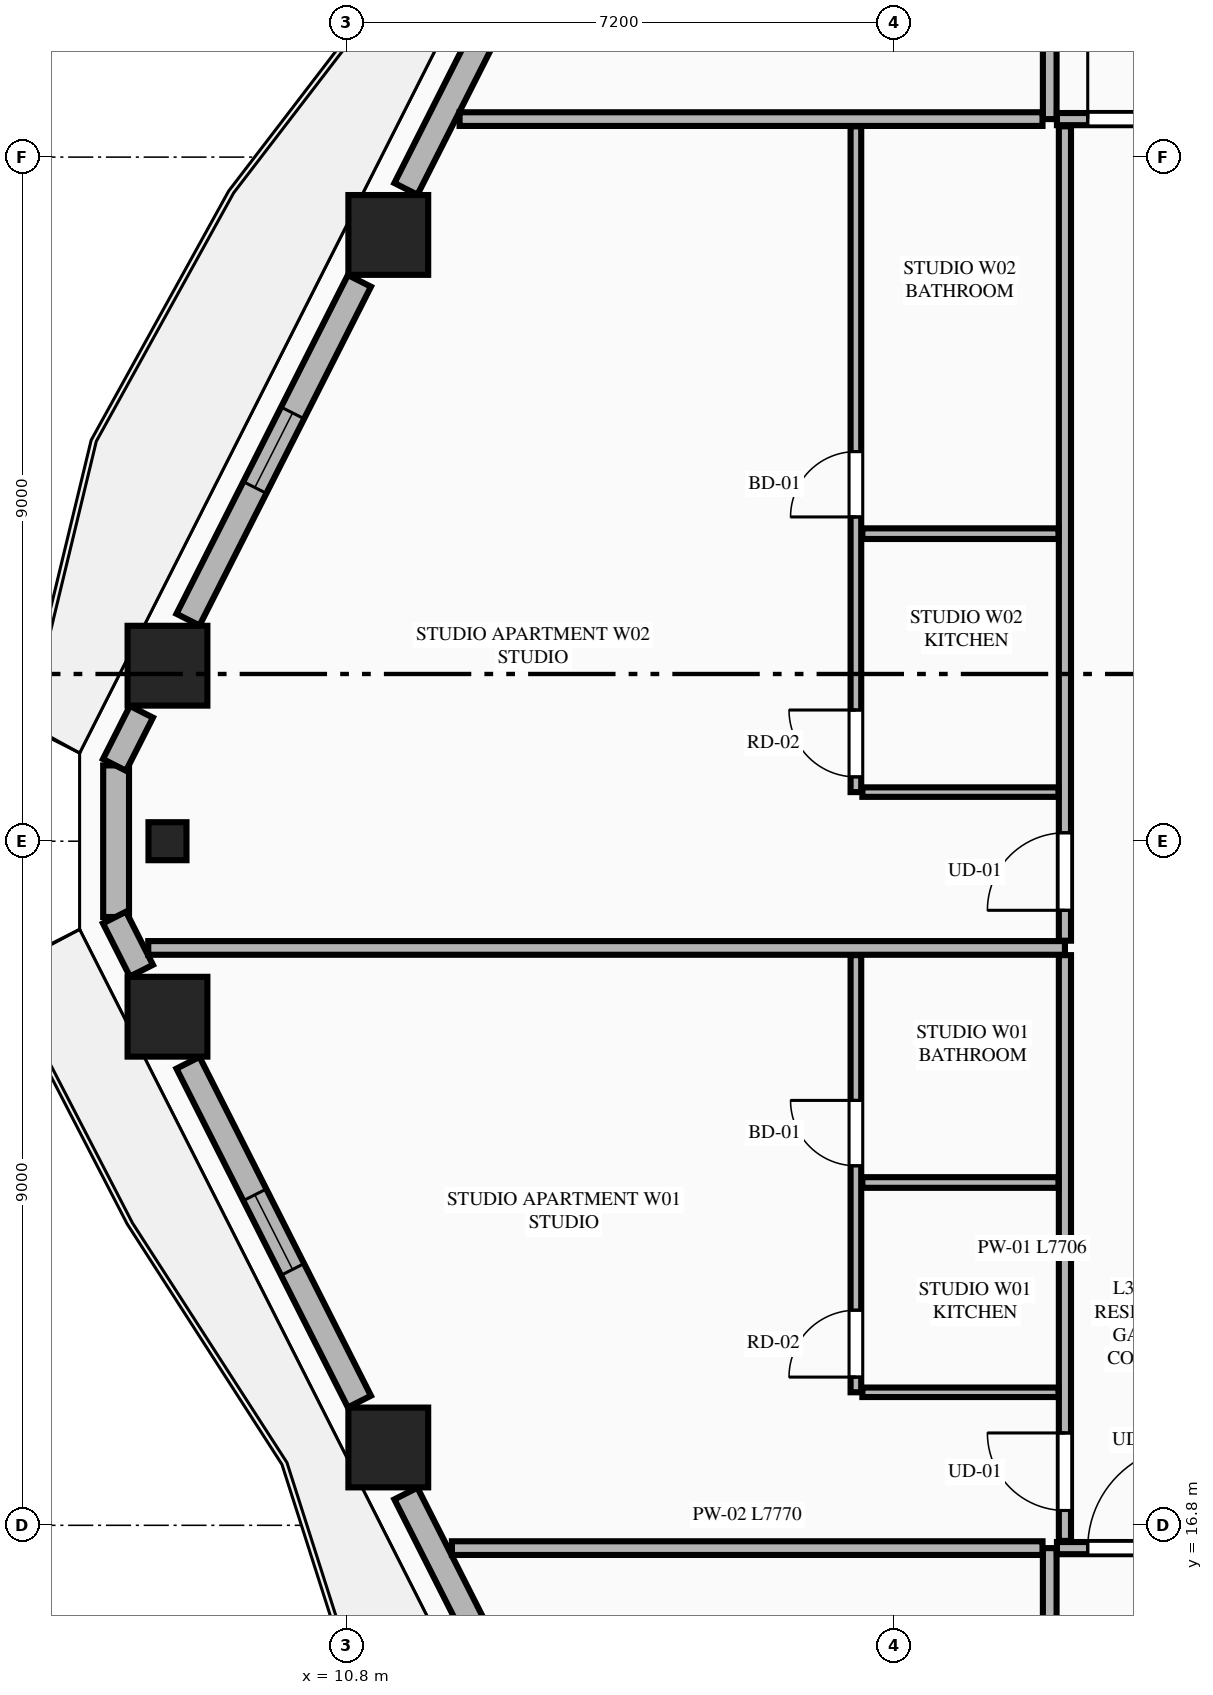
"""IFC4 building model, lengths in metres.
Left out: names, types, materials, properties, quantities, classifications, styles, units other than length and angle.
Written with IfcOpenShell. Run it as: python <this file> out.ifc"""

import sys

from ifc_helpers import new_model, si_unit, direction, frame, frame_2d, origin, origin_2d, place, context, subcontext, project, spatial, rectangle, extrude, element, fill, save


model = new_model("IFC4")
c1 = context("Model", 3, precision=1e-05, world=origin(), true_north=direction((0.0, 1.0)))
c2 = subcontext(c1, "Body", "Model", "MODEL_VIEW")
j1 = project(units=[si_unit("LENGTHUNIT", "METRE"), si_unit("PLANEANGLEUNIT", "RADIAN")], contexts=[c1])
p1 = place(None, origin())
s1 = spatial("IfcSite", under=j1, at=p1, CompositionType="ELEMENT")
p2 = place(p1, origin())
s2 = spatial("IfcBuilding", under=s1, at=p2, CompositionType="ELEMENT")
p3 = place(p2, frame((0.0, 0.0, 144.55)))
s3 = spatial("IfcBuildingStorey", under=s2, at=p3, CompositionType="ELEMENT", Elevation=144.55)
for number, where, z_axis, x_axis in (
    (1, (11.348, 33.776, 0.0), (0.0, 0.0, 1.0), (1.0, 0.0, 0.0)),
    (2, (8.443, 28.109, 0.0), (0.0, 0.0, 1.0), (1.0, 0.0, 0.0)),
    (3, (8.443, 23.491, 0.0), (0.0, 0.0, 1.0), (1.0, 0.0, 0.0)),
    (4, (11.348, 17.824, 0.0), (0.0, 0.0, 1.0), (1.0, 0.0, 0.0)),
):
    element("IfcColumn", number, at=place(p3, frame(where, z_axis=z_axis, x_axis=x_axis)), inside=s3, PredefinedType="COLUMN", context=c2, shape_type="SweptSolid", body=[
        extrude(rectangle(XDim=1.05, YDim=1.05, at=origin_2d()), origin(), (0.0, 0.0, 1.0), 3.55),
    ])
p4 = place(p3, frame((8.443, 25.8, 0.0), z_axis=(0.0, 0.0, 1.0), x_axis=(0.0, -1.0, 0.0)))
e5 = element("IfcColumn", 5, at=p4, inside=s3, PredefinedType="PILASTER", context=c2, shape_type="SweptSolid", body=[
    extrude(rectangle(XDim=0.5, YDim=0.35, at=origin_2d()), origin(), (0.0, 0.0, 1.0), 3.55),
])
p5 = place(p3, frame((7.767, 26.797, 0.0), z_axis=(0.0, 0.0, 1.0), x_axis=(0.0, -1.0, 0.0)))
e6 = element("IfcWall", 6, at=p5, inside=s3, PredefinedType="STANDARD", context=c2, shape_type="SweptSolid", body=[
    extrude(rectangle(XDim=1.994, YDim=0.34, at=frame_2d((0.997, 0.0))), origin(), (0.0, 0.0, 1.0), 3.27),
])
p6 = place(p3, frame((13.937, 39.039, 0.0), z_axis=(0.0, 0.0, 1.0), x_axis=(-0.451567731634, -0.892236842855, 0.0)))
e7 = element("IfcWall", 7, at=p6, inside=s3, PredefinedType="STANDARD", context=c2, shape_type="SweptSolid", body=[
    extrude(rectangle(XDim=5.219, YDim=0.34, at=frame_2d((2.61, 0.0))), origin(), (0.0, 0.0, 1.0), 2.727),
])
p7 = place(p6, frame((1.42, 0.0, 0.0)))
e8 = element("IfcOpeningElement", 8, at=p7, cuts=e7, PredefinedType="OPENING", context=c2, shape_type="SweptSolid", body=[
    extrude(rectangle(XDim=1.1, YDim=2.25, at=frame_2d((0.55, 1.125))), frame((0.0, 0.18, 0.0), z_axis=(0.0, -1.0, 0.0), x_axis=(1.0, 0.0, 0.0)), (0.0, 0.0, 1.0), 0.36),
])
p8 = place(p3, frame((10.968, 33.172, 0.0), z_axis=(0.0, 0.0, 1.0), x_axis=(-0.451470533039, -0.892286029139, 0.0)))
e9 = element("IfcWall", 9, at=p8, inside=s3, PredefinedType="STANDARD", context=c2, shape_type="SweptSolid", body=[
    extrude(rectangle(XDim=4.995, YDim=0.34, at=frame_2d((2.498, 0.0))), origin(), (0.0, 0.0, 1.0), 2.727),
])
p9 = place(p8, frame((1.947, 0.0, 0.75)))
e10 = element("IfcOpeningElement", 10, at=p9, cuts=e9, PredefinedType="OPENING", context=c2, shape_type="SweptSolid", body=[
    extrude(rectangle(XDim=1.1, YDim=1.827, at=frame_2d((0.55, 0.914))), frame((0.0, 0.18, 0.0), z_axis=(0.0, -1.0, 0.0), x_axis=(1.0, 0.0, 0.0)), (0.0, 0.0, 1.0), 0.36),
])
for number, where, z_axis, x_axis in (
    (11, (8.1, 27.503, 0.0), (0.0, 0.0, 1.0), (-0.452, -0.892, 0.0)),
    (12, (7.746, 24.796, 0.0), (0.0, 0.0, 1.0), (0.452, -0.892, 0.0)),
):
    element("IfcWall", number, at=place(p3, frame(where, z_axis=z_axis, x_axis=x_axis)), inside=s3, PredefinedType="STANDARD", context=c2, shape_type="SweptSolid", body=[
        extrude(rectangle(XDim=0.783, YDim=0.34, at=frame_2d((0.392, 0.0))), origin(), (0.0, 0.0, 1.0), 3.27),
    ])
p10 = place(p3, frame((8.713, 22.885, 0.0), z_axis=(0.0, 0.0, 1.0), x_axis=(0.451470533039, -0.892286029139, 0.0)))
e13 = element("IfcWall", 13, at=p10, inside=s3, PredefinedType="STANDARD", context=c2, shape_type="SweptSolid", body=[
    extrude(rectangle(XDim=4.995, YDim=0.34, at=frame_2d((2.498, 0.0))), origin(), (0.0, 0.0, 1.0), 2.727),
])
p11 = place(p10, frame((1.947, 0.0, 0.75)))
e14 = element("IfcOpeningElement", 14, at=p11, cuts=e13, PredefinedType="OPENING", context=c2, shape_type="SweptSolid", body=[
    extrude(rectangle(XDim=1.1, YDim=1.827, at=frame_2d((0.55, 0.914))), frame((0.0, 0.18, 0.0), z_axis=(0.0, -1.0, 0.0), x_axis=(1.0, 0.0, 0.0)), (0.0, 0.0, 1.0), 0.36),
])
p12 = place(p3, frame((11.58, 17.218, 0.0), z_axis=(0.0, 0.0, 1.0), x_axis=(0.451567731634, -0.892236842855, 0.0)))
e15 = element("IfcWall", 15, at=p12, inside=s3, PredefinedType="STANDARD", context=c2, shape_type="SweptSolid", body=[
    extrude(rectangle(XDim=5.219, YDim=0.34, at=frame_2d((2.61, 0.0))), origin(), (0.0, 0.0, 1.0), 2.727),
])
p13 = place(p12, frame((2.587, 0.0, 0.0)))
e16 = element("IfcOpeningElement", 16, at=p13, cuts=e15, PredefinedType="OPENING", context=c2, shape_type="SweptSolid", body=[
    extrude(rectangle(XDim=1.1, YDim=2.25, at=frame_2d((0.55, 1.125))), frame((0.0, 0.18, 0.0), z_axis=(0.0, -1.0, 0.0), x_axis=(1.0, 0.0, 0.0)), (0.0, 0.0, 1.0), 0.36),
])
p14 = place(p3, frame((20.05, 4.105, 0.0), z_axis=(0.0, 0.0, 1.0), x_axis=(0.0, 1.0, 0.0)))
e17 = element("IfcWall", 17, at=p14, inside=s3, PredefinedType="PARTITIONING", context=c2, shape_type="SweptSolid", body=[
    extrude(rectangle(XDim=12.395, YDim=0.18, at=frame_2d((6.198, 0.0))), origin(), (0.0, 0.0, 1.0), 3.27),
])
p15 = place(p3, frame((20.145, 16.5, 0.0), z_axis=(0.0, 0.0, 1.0), x_axis=(1.0, 0.0, 0.0)))
e18 = element("IfcWall", 18, at=p15, inside=s3, PredefinedType="PARTITIONING", context=c2, shape_type="SweptSolid", body=[
    extrude(rectangle(XDim=24.51, YDim=0.16, at=frame_2d((12.255, 0.0))), origin(), (0.0, 0.0, 1.0), 3.27),
])
p16 = place(p15, frame((0.405, 0.0, 0.0)))
e19 = element("IfcOpeningElement", 19, at=p16, cuts=e18, PredefinedType="OPENING", context=c2, shape_type="SweptSolid", body=[
    extrude(rectangle(XDim=1.35, YDim=2.35, at=frame_2d((0.675, 1.175))), frame((0.0, 0.09, 0.0), z_axis=(0.0, -1.0, 0.0), x_axis=(1.0, 0.0, 0.0)), (0.0, 0.0, 1.0), 0.18),
])
p17 = place(p3, frame((20.05, 35.3, 0.0), z_axis=(0.0, 0.0, 1.0), x_axis=(0.0, 1.0, 0.0)))
e20 = element("IfcWall", 20, at=p17, inside=s3, PredefinedType="PARTITIONING", context=c2, shape_type="SweptSolid", body=[
    extrude(rectangle(XDim=12.195, YDim=0.18, at=frame_2d((6.098, 0.0))), origin(), (0.0, 0.0, 1.0), 3.27),
])
p18 = place(p3, frame((20.145, 35.3, 0.0), z_axis=(0.0, 0.0, 1.0), x_axis=(1.0, 0.0, 0.0)))
e21 = element("IfcWall", 21, at=p18, inside=s3, PredefinedType="PARTITIONING", context=c2, shape_type="SweptSolid", body=[
    extrude(rectangle(XDim=24.51, YDim=0.16, at=frame_2d((12.255, 0.0))), origin(), (0.0, 0.0, 1.0), 3.27),
])
p19 = place(p18, frame((0.405, 0.0, 0.0)))
e22 = element("IfcOpeningElement", 22, at=p19, cuts=e21, PredefinedType="OPENING", context=c2, shape_type="SweptSolid", body=[
    extrude(rectangle(XDim=1.35, YDim=2.35, at=frame_2d((0.675, 1.175))), frame((0.0, 0.09, 0.0), z_axis=(0.0, -1.0, 0.0), x_axis=(1.0, 0.0, 0.0)), (0.0, 0.0, 1.0), 0.18),
])
p20 = place(p3, frame((12.185, 16.5, 0.0), z_axis=(0.0, 0.0, 1.0), x_axis=(1.0, 0.0, 0.0)))
e23 = element("IfcWall", 23, at=p20, inside=s3, PredefinedType="PARTITIONING", context=c2, shape_type="SweptSolid", body=[
    extrude(rectangle(XDim=7.77, YDim=0.18, at=frame_2d((3.885, 0.0))), origin(), (0.0, 0.0, 1.0), 3.27),
])
p21 = place(p3, frame((12.286, 35.3, 0.0), z_axis=(0.0, 0.0, 1.0), x_axis=(1.0, 0.0, 0.0)))
e24 = element("IfcWall", 24, at=p21, inside=s3, PredefinedType="PARTITIONING", context=c2, shape_type="SweptSolid", body=[
    extrude(rectangle(XDim=7.669, YDim=0.18, at=frame_2d((3.834, 0.0))), origin(), (0.0, 0.0, 1.0), 3.27),
])
p22 = place(p3, frame((20.25, 16.595, 0.0), z_axis=(0.0, 0.0, 1.0), x_axis=(0.0, 1.0, 0.0)))
e25 = element("IfcWall", 25, at=p22, inside=s3, PredefinedType="PARTITIONING", context=c2, shape_type="SweptSolid", body=[
    extrude(rectangle(XDim=7.706, YDim=0.16, at=frame_2d((3.853, 0.0))), origin(), (0.0, 0.0, 1.0), 3.27),
])
p23 = place(p22, frame((0.4, 0.0, 0.0)))
e26 = element("IfcOpeningElement", 26, at=p23, cuts=e25, PredefinedType="OPENING", context=c2, shape_type="SweptSolid", body=[
    extrude(rectangle(XDim=1.02, YDim=2.25, at=frame_2d((0.51, 1.125))), frame((0.0, 0.09, 0.0), z_axis=(0.0, -1.0, 0.0), x_axis=(1.0, 0.0, 0.0)), (0.0, 0.0, 1.0), 0.18),
])
p24 = place(p3, frame((17.585, 18.55, 0.0), z_axis=(0.0, 0.0, 1.0), x_axis=(1.0, 0.0, 0.0)))
e27 = element("IfcWall", 27, at=p24, inside=s3, PredefinedType="PARTITIONING", context=c2, shape_type="SweptSolid", body=[
    extrude(rectangle(XDim=2.58, YDim=0.125, at=frame_2d((1.29, 0.0))), origin(), (0.0, 0.0, 1.0), 2.652),
])
p25 = place(p3, frame((17.5, 18.55, 0.0), z_axis=(0.0, 0.0, 1.0), x_axis=(0.0, 1.0, 0.0)))
e28 = element("IfcWall", 28, at=p25, inside=s3, PredefinedType="PLUMBINGWALL", context=c2, shape_type="SweptSolid", body=[
    extrude(rectangle(XDim=5.751, YDim=0.14, at=frame_2d((2.875, 0.0))), origin(), (0.0, 0.0, 1.0), 3.27),
])
p26 = place(p25, frame((2.98, 0.0, 0.0)))
e29 = element("IfcOpeningElement", 29, at=p26, cuts=e28, PredefinedType="OPENING", context=c2, shape_type="SweptSolid", body=[
    extrude(rectangle(XDim=0.86, YDim=2.1, at=frame_2d((0.43, 1.05))), frame((0.0, 0.08, 0.0), z_axis=(0.0, -1.0, 0.0), x_axis=(1.0, 0.0, 0.0)), (0.0, 0.0, 1.0), 0.16),
])
p27 = place(p25, frame((0.2, 0.0, 0.0)))
e30 = element("IfcOpeningElement", 30, at=p27, cuts=e28, PredefinedType="OPENING", context=c2, shape_type="SweptSolid", body=[
    extrude(rectangle(XDim=0.88, YDim=2.15, at=frame_2d((0.44, 1.075))), frame((0.0, 0.08, 0.0), z_axis=(0.0, -1.0, 0.0), x_axis=(1.0, 0.0, 0.0)), (0.0, 0.0, 1.0), 0.16),
])
p28 = place(p3, frame((17.585, 21.31, 0.0), z_axis=(0.0, 0.0, 1.0), x_axis=(1.0, 0.0, 0.0)))
e31 = element("IfcWall", 31, at=p28, inside=s3, PredefinedType="PLUMBINGWALL", context=c2, shape_type="SweptSolid", body=[
    extrude(rectangle(XDim=2.58, YDim=0.14, at=frame_2d((1.29, 0.0))), origin(), (0.0, 0.0, 1.0), 3.27),
])
p29 = place(p3, frame((8.19, 24.396, 0.0), z_axis=(0.0, 0.0, 1.0), x_axis=(1.0, 0.0, 0.0)))
e32 = element("IfcWall", 32, at=p29, inside=s3, PredefinedType="PARTITIONING", context=c2, shape_type="SweptSolid", body=[
    extrude(rectangle(XDim=12.06, YDim=0.18, at=frame_2d((6.03, 0.0))), origin(), (0.0, 0.0, 1.0), 3.27),
])
p30 = place(p3, frame((20.25, 24.491, 0.0), z_axis=(0.0, 0.0, 1.0), x_axis=(0.0, 1.0, 0.0)))
e33 = element("IfcWall", 33, at=p30, inside=s3, PredefinedType="PARTITIONING", context=c2, shape_type="SweptSolid", body=[
    extrude(rectangle(XDim=10.714, YDim=0.16, at=frame_2d((5.357, 0.0))), origin(), (0.0, 0.0, 1.0), 3.27),
])
p31 = place(p30, frame((0.4, 0.0, 0.0)))
e34 = element("IfcOpeningElement", 34, at=p31, cuts=e33, PredefinedType="OPENING", context=c2, shape_type="SweptSolid", body=[
    extrude(rectangle(XDim=1.02, YDim=2.25, at=frame_2d((0.51, 1.125))), frame((0.0, 0.09, 0.0), z_axis=(0.0, -1.0, 0.0), x_axis=(1.0, 0.0, 0.0)), (0.0, 0.0, 1.0), 0.18),
])
p32 = place(p3, frame((17.585, 26.446, 0.0), z_axis=(0.0, 0.0, 1.0), x_axis=(1.0, 0.0, 0.0)))
e35 = element("IfcWall", 35, at=p32, inside=s3, PredefinedType="PARTITIONING", context=c2, shape_type="SweptSolid", body=[
    extrude(rectangle(XDim=2.58, YDim=0.125, at=frame_2d((1.29, 0.0))), origin(), (0.0, 0.0, 1.0), 3.27),
])
p33 = place(p3, frame((17.5, 26.446, 0.0), z_axis=(0.0, 0.0, 1.0), x_axis=(0.0, 1.0, 0.0)))
e36 = element("IfcWall", 36, at=p33, inside=s3, PredefinedType="PLUMBINGWALL", context=c2, shape_type="SweptSolid", body=[
    extrude(rectangle(XDim=8.759, YDim=0.14, at=frame_2d((4.379, 0.0))), origin(), (0.0, 0.0, 1.0), 3.27),
])
p34 = place(p33, frame((3.62, 0.0, 0.0)))
e37 = element("IfcOpeningElement", 37, at=p34, cuts=e36, PredefinedType="OPENING", context=c2, shape_type="SweptSolid", body=[
    extrude(rectangle(XDim=0.86, YDim=2.1, at=frame_2d((0.43, 1.05))), frame((0.0, 0.08, 0.0), z_axis=(0.0, -1.0, 0.0), x_axis=(1.0, 0.0, 0.0)), (0.0, 0.0, 1.0), 0.16),
])
p35 = place(p33, frame((0.2, 0.0, 0.0)))
e38 = element("IfcOpeningElement", 38, at=p35, cuts=e36, PredefinedType="OPENING", context=c2, shape_type="SweptSolid", body=[
    extrude(rectangle(XDim=0.88, YDim=2.15, at=frame_2d((0.44, 1.075))), frame((0.0, 0.08, 0.0), z_axis=(0.0, -1.0, 0.0), x_axis=(1.0, 0.0, 0.0)), (0.0, 0.0, 1.0), 0.16),
])
p36 = place(p3, frame((17.585, 29.846, 0.0), z_axis=(0.0, 0.0, 1.0), x_axis=(1.0, 0.0, 0.0)))
e39 = element("IfcWall", 39, at=p36, inside=s3, PredefinedType="PLUMBINGWALL", context=c2, shape_type="SweptSolid", body=[
    extrude(rectangle(XDim=2.58, YDim=0.14, at=frame_2d((1.29, 0.0))), origin(), (0.0, 0.0, 1.0), 3.27),
])
p37 = place(p9, origin())
e40 = element("IfcWindow", 40, at=p37, inside=s3, PartitioningType="SINGLE_PANEL", PredefinedType="WINDOW", context=c2, shape_type="SweptSolid", body=[
    extrude(rectangle(XDim=1.1, YDim=1.827, at=frame_2d((0.55, 0.914))), frame((0.0, 0.03, 0.0), z_axis=(0.0, -1.0, 0.0), x_axis=(1.0, 0.0, 0.0)), (0.0, 0.0, 1.0), 0.06),
])
fill(e10, e40)
p38 = place(p11, origin())
e41 = element("IfcWindow", 41, at=p38, inside=s3, PartitioningType="SINGLE_PANEL", PredefinedType="WINDOW", context=c2, shape_type="SweptSolid", body=[
    extrude(rectangle(XDim=1.1, YDim=1.827, at=frame_2d((0.55, 0.914))), frame((0.0, 0.03, 0.0), z_axis=(0.0, -1.0, 0.0), x_axis=(1.0, 0.0, 0.0)), (0.0, 0.0, 1.0), 0.06),
])
fill(e14, e41)
p39 = place(p16, origin())
e42 = element("IfcDoor", 42, at=p39, inside=s3, OperationType="SINGLE_SWING_RIGHT", PredefinedType="DOOR", context=c2, shape_type="SweptSolid", body=[
    extrude(rectangle(XDim=1.35, YDim=2.35, at=frame_2d((0.675, 1.175))), frame((0.0, 0.025, 0.0), z_axis=(0.0, -1.0, 0.0), x_axis=(1.0, 0.0, 0.0)), (0.0, 0.0, 1.0), 0.05),
])
fill(e19, e42)
p40 = place(p19, origin())
e43 = element("IfcDoor", 43, at=p40, inside=s3, OperationType="SINGLE_SWING_LEFT", PredefinedType="DOOR", context=c2, shape_type="SweptSolid", body=[
    extrude(rectangle(XDim=1.35, YDim=2.35, at=frame_2d((0.675, 1.175))), frame((0.0, 0.025, 0.0), z_axis=(0.0, -1.0, 0.0), x_axis=(1.0, 0.0, 0.0)), (0.0, 0.0, 1.0), 0.05),
])
fill(e22, e43)
p41 = place(p26, origin())
e44 = element("IfcDoor", 44, at=p41, inside=s3, OperationType="SINGLE_SWING_RIGHT", PredefinedType="DOOR", context=c2, shape_type="SweptSolid", body=[
    extrude(rectangle(XDim=0.86, YDim=2.1, at=frame_2d((0.43, 1.05))), frame((0.0, 0.025, 0.0), z_axis=(0.0, -1.0, 0.0), x_axis=(1.0, 0.0, 0.0)), (0.0, 0.0, 1.0), 0.05),
])
fill(e29, e44)
p42 = place(p23, origin())
e45 = element("IfcDoor", 45, at=p42, inside=s3, OperationType="SINGLE_SWING_RIGHT", PredefinedType="DOOR", context=c2, shape_type="SweptSolid", body=[
    extrude(rectangle(XDim=1.02, YDim=2.25, at=frame_2d((0.51, 1.125))), frame((0.0, 0.025, 0.0), z_axis=(0.0, -1.0, 0.0), x_axis=(1.0, 0.0, 0.0)), (0.0, 0.0, 1.0), 0.05),
])
fill(e26, e45)
p43 = place(p27, origin())
e46 = element("IfcDoor", 46, at=p43, inside=s3, OperationType="SINGLE_SWING_LEFT", PredefinedType="DOOR", context=c2, shape_type="SweptSolid", body=[
    extrude(rectangle(XDim=0.88, YDim=2.15, at=frame_2d((0.44, 1.075))), frame((0.0, 0.025, 0.0), z_axis=(0.0, -1.0, 0.0), x_axis=(1.0, 0.0, 0.0)), (0.0, 0.0, 1.0), 0.05),
])
fill(e30, e46)
p44 = place(p34, origin())
e47 = element("IfcDoor", 47, at=p44, inside=s3, OperationType="SINGLE_SWING_LEFT", PredefinedType="DOOR", context=c2, shape_type="SweptSolid", body=[
    extrude(rectangle(XDim=0.86, YDim=2.1, at=frame_2d((0.43, 1.05))), frame((0.0, 0.025, 0.0), z_axis=(0.0, -1.0, 0.0), x_axis=(1.0, 0.0, 0.0)), (0.0, 0.0, 1.0), 0.05),
])
fill(e37, e47)
p45 = place(p31, origin())
e48 = element("IfcDoor", 48, at=p45, inside=s3, OperationType="SINGLE_SWING_LEFT", PredefinedType="DOOR", context=c2, shape_type="SweptSolid", body=[
    extrude(rectangle(XDim=1.02, YDim=2.25, at=frame_2d((0.51, 1.125))), frame((0.0, 0.025, 0.0), z_axis=(0.0, -1.0, 0.0), x_axis=(1.0, 0.0, 0.0)), (0.0, 0.0, 1.0), 0.05),
])
fill(e34, e48)
p46 = place(p35, origin())
e49 = element("IfcDoor", 49, at=p46, inside=s3, OperationType="SINGLE_SWING_RIGHT", PredefinedType="DOOR", context=c2, shape_type="SweptSolid", body=[
    extrude(rectangle(XDim=0.88, YDim=2.15, at=frame_2d((0.44, 1.075))), frame((0.0, 0.025, 0.0), z_axis=(0.0, -1.0, 0.0), x_axis=(1.0, 0.0, 0.0)), (0.0, 0.0, 1.0), 0.05),
])
fill(e38, e49)
save(model, sys.argv[1])
